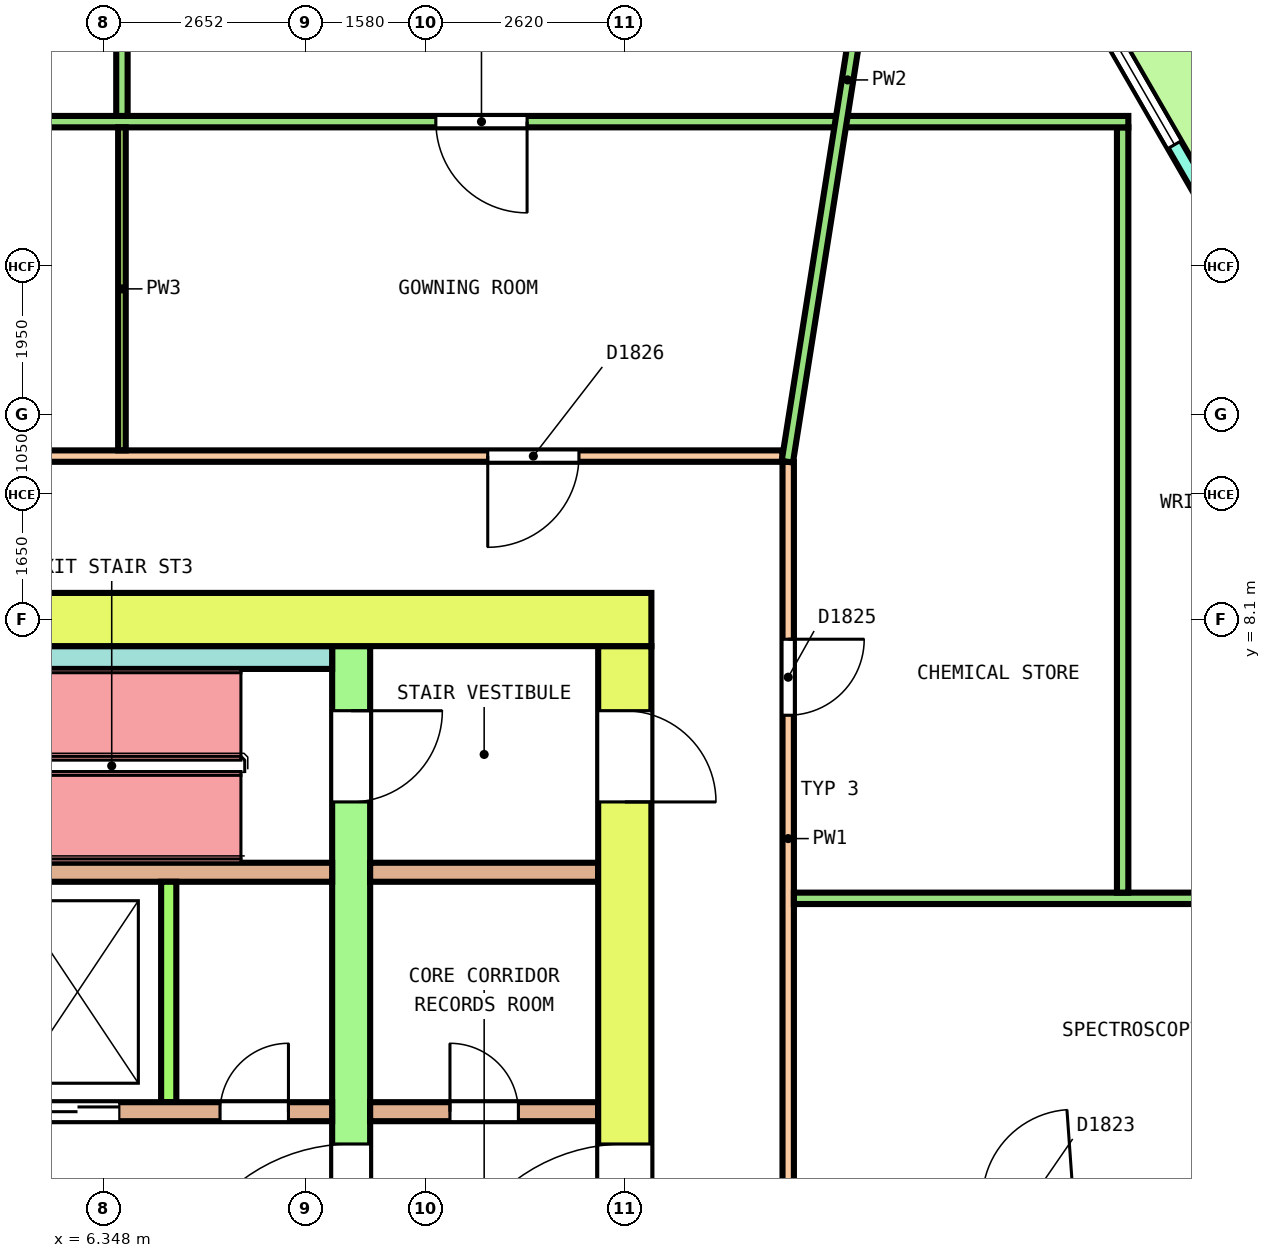
"""IFC4 building model, lengths in metres.
Left out: names, types, materials, properties, quantities, classifications, styles, units other than length and angle.
Written with IfcOpenShell. Run it as: python <this file> out.ifc"""

import sys

from ifc_helpers import new_model, si_unit, direction, frame, frame_2d, origin, place, context, subcontext, project, spatial, polyline, rectangle, outline, extrude, element, fill, save


model = new_model("IFC4")
c1 = context("Model", 3, precision=1e-05, world=origin(), true_north=direction((0.0, 1.0)))
c2 = subcontext(c1, "Body", "Model", "MODEL_VIEW")
j1 = project(units=[si_unit("LENGTHUNIT", "METRE"), si_unit("PLANEANGLEUNIT", "RADIAN")], contexts=[c1])
p1 = place(None, origin())
s1 = spatial("IfcSite", under=j1, at=p1, CompositionType="ELEMENT")
p2 = place(p1, origin())
s2 = spatial("IfcBuilding", under=s1, at=p2, CompositionType="ELEMENT")
p3 = place(p2, frame((0.0, 0.0, 176.0)))
s3 = spatial("IfcBuildingStorey", under=s2, at=p3, CompositionType="ELEMENT", Elevation=176.0)
p4 = place(p3, frame((26.172, 4.405, 0.0), z_axis=(0.0, 0.0, 1.0), x_axis=(-0.500000942564, 0.866024859594, 0.0)))
e1 = element("IfcWall", 1, at=p4, inside=s3, PredefinedType="SOLIDWALL", context=c2, shape_type="SweptSolid", body=[
    extrude(outline(polyline([(-0.027, -0.1), (1.006, -0.1), (2.039, -0.1), (3.072, -0.1), (4.105, -0.1), (5.138, -0.1), (6.172, -0.1), (7.205, -0.1), (8.238, -0.1), (9.271, -0.1), (10.304, -0.1), (11.337, -0.1), (12.37, -0.1), (13.403, -0.1), (14.436, -0.1), (15.469, -0.1), (16.502, -0.1), (17.535, -0.1), (18.568, -0.1), (18.515, 0.1), (17.488, 0.1), (16.46, 0.1), (15.433, 0.1), (14.406, 0.1), (13.379, 0.1), (12.352, 0.1), (11.325, 0.1), (10.298, 0.1), (9.271, 0.1), (8.244, 0.1), (7.217, 0.1), (6.189, 0.1), (5.162, 0.1), (4.135, 0.1), (3.108, 0.1), (2.081, 0.1), (1.054, 0.1), (0.027, 0.1), (-0.027, -0.1)])), origin(), (0.0, 0.0, 1.0), 4.1),
])
p5 = place(p4, frame((0.354, 0.0, 0.1)))
e2 = element("IfcOpeningElement", 2, at=p5, cuts=e1, PredefinedType="OPENING", context=c2, shape_type="SweptSolid", body=[
    extrude(rectangle(XDim=3.0, YDim=2.9, at=frame_2d((1.5, 1.45))), frame((0.0, 0.11, 0.0), z_axis=(0.0, -1.0, 0.0), x_axis=(1.0, 0.0, 0.0)), (0.0, 0.0, 1.0), 0.22),
])
p6 = place(p4, frame((4.062, 0.0, 0.1)))
e3 = element("IfcOpeningElement", 3, at=p6, cuts=e1, PredefinedType="OPENING", context=c2, shape_type="SweptSolid", body=[
    extrude(rectangle(XDim=3.0, YDim=2.9, at=frame_2d((1.5, 1.45))), frame((0.0, 0.11, 0.0), z_axis=(0.0, -1.0, 0.0), x_axis=(1.0, 0.0, 0.0)), (0.0, 0.0, 1.0), 0.22),
])
p7 = place(p4, frame((8.371, 0.0, 0.0)))
e4 = element("IfcOpeningElement", 4, at=p7, cuts=e1, PredefinedType="OPENING", context=c2, shape_type="SweptSolid", body=[
    extrude(rectangle(XDim=1.8, YDim=2.4, at=frame_2d((0.9, 1.2))), frame((0.0, 0.11, 0.0), z_axis=(0.0, -1.0, 0.0), x_axis=(1.0, 0.0, 0.0)), (0.0, 0.0, 1.0), 0.22),
])
p8 = place(p4, frame((8.371, 0.0, 2.55)))
e5 = element("IfcOpeningElement", 5, at=p8, cuts=e1, PredefinedType="OPENING", context=c2, shape_type="SweptSolid", body=[
    extrude(rectangle(XDim=1.8, YDim=0.45, at=frame_2d((0.9, 0.225))), frame((0.0, 0.11, 0.0), z_axis=(0.0, -1.0, 0.0), x_axis=(1.0, 0.0, 0.0)), (0.0, 0.0, 1.0), 0.22),
])
p9 = place(p4, frame((11.479, 0.0, 0.1)))
e6 = element("IfcOpeningElement", 6, at=p9, cuts=e1, PredefinedType="OPENING", context=c2, shape_type="SweptSolid", body=[
    extrude(rectangle(XDim=3.0, YDim=2.9, at=frame_2d((1.5, 1.45))), frame((0.0, 0.11, 0.0), z_axis=(0.0, -1.0, 0.0), x_axis=(1.0, 0.0, 0.0)), (0.0, 0.0, 1.0), 0.22),
])
p10 = place(p4, frame((15.188, 0.0, 0.1)))
e7 = element("IfcOpeningElement", 7, at=p10, cuts=e1, PredefinedType="OPENING", context=c2, shape_type="SweptSolid", body=[
    extrude(rectangle(XDim=3.0, YDim=2.9, at=frame_2d((1.5, 1.45))), frame((0.0, 0.11, 0.0), z_axis=(0.0, -1.0, 0.0), x_axis=(1.0, 0.0, 0.0)), (0.0, 0.0, 1.0), 0.22),
])
p11 = place(p3, frame((-13.55, 8.1, 0.0), z_axis=(0.0, 0.0, 1.0), x_axis=(1.0, 0.0, 0.0)))
e8 = element("IfcWall", 8, at=p11, inside=s3, PredefinedType="SHEAR", context=c2, shape_type="SweptSolid", body=[
    extrude(rectangle(XDim=27.1, YDim=0.7, at=frame_2d((13.55, 0.0))), origin(), (0.0, 0.0, 1.0), 4.1),
])
p12 = place(p11, frame((14.475, 0.0, 0.0)))
e9 = element("IfcOpeningElement", 9, at=p12, cuts=e8, PredefinedType="OPENING", context=c2, shape_type="SweptSolid", body=[
    extrude(rectangle(XDim=1.4, YDim=2.1, at=frame_2d((0.7, 1.05))), frame((0.0, 0.36, 0.0), z_axis=(0.0, -1.0, 0.0), x_axis=(1.0, 0.0, 0.0)), (0.0, 0.0, 1.0), 0.72),
])
p13 = place(p3, frame((13.2, -7.75, 0.0), z_axis=(0.0, 0.0, 1.0), x_axis=(0.0, 1.0, 0.0)))
e10 = element("IfcWall", 10, at=p13, inside=s3, PredefinedType="SHEAR", context=c2, shape_type="SweptSolid", body=[
    extrude(rectangle(XDim=15.5, YDim=0.7, at=frame_2d((7.75, 0.0))), origin(), (0.0, 0.0, 1.0), 4.1),
])
p14 = place(p13, frame((6.55, 0.0, 0.0)))
e11 = element("IfcOpeningElement", 11, at=p14, cuts=e10, PredefinedType="OPENING", context=c2, shape_type="SweptSolid", body=[
    extrude(rectangle(XDim=2.4, YDim=2.1, at=frame_2d((1.2, 1.05))), frame((0.0, 0.36, 0.0), z_axis=(0.0, -1.0, 0.0), x_axis=(1.0, 0.0, 0.0)), (0.0, 0.0, 1.0), 0.72),
])
p15 = place(p13, frame((13.45, 0.0, 0.0)))
e12 = element("IfcOpeningElement", 12, at=p15, cuts=e10, PredefinedType="OPENING", context=c2, shape_type="SweptSolid", body=[
    extrude(rectangle(XDim=1.2, YDim=2.1, at=frame_2d((0.6, 1.05))), frame((0.0, 0.36, 0.0), z_axis=(0.0, -1.0, 0.0), x_axis=(1.0, 0.0, 0.0)), (0.0, 0.0, 1.0), 0.72),
])
p16 = place(p13, frame((0.95, 0.0, 0.0)))
e13 = element("IfcOpeningElement", 13, at=p16, cuts=e10, PredefinedType="OPENING", context=c2, shape_type="SweptSolid", body=[
    extrude(rectangle(XDim=1.0, YDim=2.1, at=frame_2d((0.5, 1.05))), frame((0.0, 0.36, 0.0), z_axis=(0.0, -1.0, 0.0), x_axis=(1.0, 0.0, 0.0)), (0.0, 0.0, 1.0), 0.72),
])
p17 = place(p3, frame((9.6, -7.75, 0.0), z_axis=(0.0, 0.0, 1.0), x_axis=(0.0, 1.0, 0.0)))
e14 = element("IfcWall", 14, at=p17, inside=s3, PredefinedType="SHEAR", context=c2, shape_type="SweptSolid", body=[
    extrude(rectangle(XDim=15.5, YDim=0.5, at=frame_2d((7.75, 0.0))), origin(), (0.0, 0.0, 1.0), 4.1),
])
p18 = place(p17, frame((6.55, 0.0, 0.0)))
e15 = element("IfcOpeningElement", 15, at=p18, cuts=e14, PredefinedType="OPENING", context=c2, shape_type="SweptSolid", body=[
    extrude(rectangle(XDim=2.4, YDim=2.1, at=frame_2d((1.2, 1.05))), frame((0.0, 0.26, 0.0), z_axis=(0.0, -1.0, 0.0), x_axis=(1.0, 0.0, 0.0)), (0.0, 0.0, 1.0), 0.52),
])
p19 = place(p17, frame((13.45, 0.0, 0.0)))
e16 = element("IfcOpeningElement", 16, at=p19, cuts=e14, PredefinedType="OPENING", context=c2, shape_type="SweptSolid", body=[
    extrude(rectangle(XDim=1.2, YDim=2.1, at=frame_2d((0.6, 1.05))), frame((0.0, 0.26, 0.0), z_axis=(0.0, -1.0, 0.0), x_axis=(1.0, 0.0, 0.0)), (0.0, 0.0, 1.0), 0.52),
])
p20 = place(p17, frame((0.95, 0.0, 0.0)))
e17 = element("IfcOpeningElement", 17, at=p20, cuts=e14, PredefinedType="OPENING", context=c2, shape_type="SweptSolid", body=[
    extrude(rectangle(XDim=1.0, YDim=2.1, at=frame_2d((0.5, 1.05))), frame((0.0, 0.26, 0.0), z_axis=(0.0, -1.0, 0.0), x_axis=(1.0, 0.0, 0.0)), (0.0, 0.0, 1.0), 0.52),
])
p21 = place(p3, frame((-9.35, 1.625, 0.0), z_axis=(0.0, 0.0, 1.0), x_axis=(1.0, 0.0, 0.0)))
e18 = element("IfcWall", 18, at=p21, inside=s3, PredefinedType="SOLIDWALL", context=c2, shape_type="SweptSolid", body=[
    extrude(rectangle(XDim=18.7, YDim=0.25, at=frame_2d((9.35, 0.0))), origin(), (0.0, 0.0, 1.0), 4.1),
])
p22 = place(p21, frame((2.85, 0.0, 0.0)))
e19 = element("IfcOpeningElement", 19, at=p22, cuts=e18, PredefinedType="OPENING", context=c2, shape_type="SweptSolid", body=[
    extrude(rectangle(XDim=1.1, YDim=2.1, at=frame_2d((0.55, 1.05))), frame((0.0, 0.135, 0.0), z_axis=(0.0, -1.0, 0.0), x_axis=(1.0, 0.0, 0.0)), (0.0, 0.0, 1.0), 0.27),
])
p23 = place(p21, frame((5.15, 0.0, 0.0)))
e20 = element("IfcOpeningElement", 20, at=p23, cuts=e18, PredefinedType="OPENING", context=c2, shape_type="SweptSolid", body=[
    extrude(rectangle(XDim=1.1, YDim=2.1, at=frame_2d((0.55, 1.05))), frame((0.0, 0.135, 0.0), z_axis=(0.0, -1.0, 0.0), x_axis=(1.0, 0.0, 0.0)), (0.0, 0.0, 1.0), 0.27),
])
p24 = place(p21, frame((14.8, 0.0, 0.0)))
e21 = element("IfcOpeningElement", 21, at=p24, cuts=e18, PredefinedType="OPENING", context=c2, shape_type="SweptSolid", body=[
    extrude(rectangle(XDim=1.1, YDim=2.1, at=frame_2d((0.55, 1.05))), frame((0.0, 0.135, 0.0), z_axis=(0.0, -1.0, 0.0), x_axis=(1.0, 0.0, 0.0)), (0.0, 0.0, 1.0), 0.27),
])
p25 = place(p21, frame((0.575, 0.0, 0.0)))
e22 = element("IfcOpeningElement", 22, at=p25, cuts=e18, PredefinedType="OPENING", context=c2, shape_type="SweptSolid", body=[
    extrude(rectangle(XDim=0.9, YDim=2.1, at=frame_2d((0.45, 1.05))), frame((0.0, 0.135, 0.0), z_axis=(0.0, -1.0, 0.0), x_axis=(1.0, 0.0, 0.0)), (0.0, 0.0, 1.0), 0.27),
])
p26 = place(p21, frame((17.225, 0.0, 0.0)))
e23 = element("IfcOpeningElement", 23, at=p26, cuts=e18, PredefinedType="OPENING", context=c2, shape_type="SweptSolid", body=[
    extrude(rectangle(XDim=0.9, YDim=2.1, at=frame_2d((0.45, 1.05))), frame((0.0, 0.135, 0.0), z_axis=(0.0, -1.0, 0.0), x_axis=(1.0, 0.0, 0.0)), (0.0, 0.0, 1.0), 0.27),
])
p27 = place(p3, frame((9.85, 1.625, 0.0), z_axis=(0.0, 0.0, 1.0), x_axis=(1.0, 0.0, 0.0)))
e24 = element("IfcWall", 24, at=p27, inside=s3, PredefinedType="SOLIDWALL", context=c2, shape_type="SweptSolid", body=[
    extrude(rectangle(XDim=3.0, YDim=0.25, at=frame_2d((1.5, 0.0))), origin(), (0.0, 0.0, 1.0), 4.1),
])
p28 = place(p27, frame((1.05, 0.0, 0.0)))
e25 = element("IfcOpeningElement", 25, at=p28, cuts=e24, PredefinedType="OPENING", context=c2, shape_type="SweptSolid", body=[
    extrude(rectangle(XDim=0.9, YDim=2.1, at=frame_2d((0.45, 1.05))), frame((0.0, 0.135, 0.0), z_axis=(0.0, -1.0, 0.0), x_axis=(1.0, 0.0, 0.0)), (0.0, 0.0, 1.0), 0.27),
])
p29 = place(p3, frame((-9.35, 4.775, 0.0), z_axis=(0.0, 0.0, 1.0), x_axis=(1.0, 0.0, 0.0)))
e26 = element("IfcWall", 26, at=p29, inside=s3, PredefinedType="SOLIDWALL", context=c2, shape_type="SweptSolid", body=[
    extrude(rectangle(XDim=18.7, YDim=0.25, at=frame_2d((9.35, 0.0))), origin(), (0.0, 0.0, 1.0), 4.1),
])
p30 = place(p3, frame((9.85, 4.775, 0.0), z_axis=(0.0, 0.0, 1.0), x_axis=(1.0, 0.0, 0.0)))
e27 = element("IfcWall", 27, at=p30, inside=s3, PredefinedType="SOLIDWALL", context=c2, shape_type="SweptSolid", body=[
    extrude(rectangle(XDim=3.0, YDim=0.25, at=frame_2d((1.5, 0.0))), origin(), (0.0, 0.0, 1.0), 4.1),
])
p31 = place(p3, frame((7.2, 1.75, 0.0), z_axis=(0.0, 0.0, 1.0), x_axis=(0.0, 1.0, 0.0)))
e28 = element("IfcWall", 28, at=p31, inside=s3, PredefinedType="SOLIDWALL", context=c2, shape_type="SweptSolid", body=[
    extrude(rectangle(XDim=2.9, YDim=0.2, at=frame_2d((1.45, 0.0))), origin(), (0.0, 0.0, 1.0), 4.1),
])
p32 = place(p3, frame((3.55, 7.6, 0.0), z_axis=(0.0, 0.0, 1.0), x_axis=(1.0, 0.0, 0.0)))
e29 = element("IfcWall", 29, at=p32, inside=s3, PredefinedType="SOLIDWALL", context=c2, shape_type="SweptSolid", body=[
    extrude(rectangle(XDim=5.8, YDim=0.3, at=frame_2d((2.9, 0.0))), origin(), (0.0, 0.0, 1.0), 4.1),
])
p33 = place(p3, frame((15.35, 0.261, 0.0), z_axis=(0.0, 0.0, 1.0), x_axis=(0.0, 1.0, 0.0)))
e30 = element("IfcWall", 30, at=p33, inside=s3, PredefinedType="PARTITIONING", context=c2, shape_type="SweptSolid", body=[
    extrude(rectangle(XDim=9.914, YDim=0.15, at=frame_2d((4.957, 0.0))), origin(), (0.0, 0.0, 1.0), 3.05),
])
p34 = place(p33, frame((6.58, 0.0, 0.0)))
e31 = element("IfcOpeningElement", 31, at=p34, cuts=e30, PredefinedType="OPENING", context=c2, shape_type="SweptSolid", body=[
    extrude(rectangle(XDim=1.0, YDim=2.1, at=frame_2d((0.5, 1.05))), frame((0.0, 0.085, 0.0), z_axis=(0.0, -1.0, 0.0), x_axis=(1.0, 0.0, 0.0)), (0.0, 0.0, 1.0), 0.17),
])
p35 = place(p3, frame((-15.275, 10.25, 0.0), z_axis=(0.0, 0.0, 1.0), x_axis=(1.0, 0.0, 0.0)))
e32 = element("IfcWall", 32, at=p35, inside=s3, PredefinedType="PARTITIONING", context=c2, shape_type="SweptSolid", body=[
    extrude(rectangle(XDim=30.55, YDim=0.15, at=frame_2d((15.275, 0.0))), origin(), (0.0, 0.0, 1.0), 3.05),
])
p36 = place(p35, frame((26.672, 0.0, 0.0)))
e33 = element("IfcOpeningElement", 33, at=p36, cuts=e32, PredefinedType="OPENING", context=c2, shape_type="SweptSolid", body=[
    extrude(rectangle(XDim=1.2, YDim=2.1, at=frame_2d((0.6, 1.05))), frame((0.0, 0.085, 0.0), z_axis=(0.0, -1.0, 0.0), x_axis=(1.0, 0.0, 0.0)), (0.0, 0.0, 1.0), 0.17),
])
p37 = place(p35, frame((13.779, 0.0, 0.0)))
e34 = element("IfcOpeningElement", 34, at=p37, cuts=e32, PredefinedType="OPENING", context=c2, shape_type="SweptSolid", body=[
    extrude(rectangle(XDim=1.2, YDim=2.1, at=frame_2d((0.6, 1.05))), frame((0.0, 0.085, 0.0), z_axis=(0.0, -1.0, 0.0), x_axis=(1.0, 0.0, 0.0)), (0.0, 0.0, 1.0), 0.17),
])
p38 = place(p3, frame((15.275, 0.18, 0.0), z_axis=(0.0, 0.0, 1.0), x_axis=(0.997445401141, 0.071432987776, 0.0)))
e35 = element("IfcWall", 35, at=p38, inside=s3, PredefinedType="PARTITIONING", context=c2, shape_type="SweptSolid", body=[
    extrude(rectangle(XDim=10.824, YDim=0.15, at=frame_2d((5.412, 0.0))), origin(), (0.0, 0.0, 1.0), 3.05),
])
p39 = place(p38, frame((2.637, 0.0, 0.0)))
e36 = element("IfcOpeningElement", 36, at=p39, cuts=e35, PredefinedType="OPENING", context=c2, shape_type="SweptSolid", body=[
    extrude(rectangle(XDim=1.2, YDim=2.1, at=frame_2d((0.6, 1.05))), frame((0.0, 0.085, 0.0), z_axis=(0.0, -1.0, 0.0), x_axis=(1.0, 0.0, 0.0)), (0.0, 0.0, 1.0), 0.17),
])
p40 = place(p3, frame((15.425, 4.432, 0.0), z_axis=(0.0, 0.0, 1.0), x_axis=(1.0, 0.0, 0.0)))
e37 = element("IfcWall", 37, at=p40, inside=s3, PredefinedType="PARTITIONING", context=c2, shape_type="SweptSolid", body=[
    extrude(rectangle(XDim=10.616, YDim=0.15, at=frame_2d((5.308, 0.0))), origin(), (0.0, 0.0, 1.0), 3.05),
])
p41 = place(p40, frame((5.823, 0.0, 0.0)))
e38 = element("IfcOpeningElement", 38, at=p41, cuts=e37, PredefinedType="OPENING", context=c2, shape_type="SweptSolid", body=[
    extrude(rectangle(XDim=1.0, YDim=2.1, at=frame_2d((0.5, 1.05))), frame((0.0, 0.085, 0.0), z_axis=(0.0, -1.0, 0.0), x_axis=(1.0, 0.0, 0.0)), (0.0, 0.0, 1.0), 0.17),
])
p42 = place(p3, frame((19.75, 4.507, 0.0), z_axis=(0.0, 0.0, 1.0), x_axis=(0.0, 1.0, 0.0)))
e39 = element("IfcWall", 39, at=p42, inside=s3, PredefinedType="PARTITIONING", context=c2, shape_type="SweptSolid", body=[
    extrude(rectangle(XDim=10.068, YDim=0.15, at=frame_2d((5.034, 0.0))), origin(), (0.0, 0.0, 1.0), 3.05),
])
p43 = place(p3, frame((-19.675, 14.65, 0.0), z_axis=(0.0, 0.0, 1.0), x_axis=(1.0, 0.0, 0.0)))
e40 = element("IfcWall", 40, at=p43, inside=s3, PredefinedType="PARTITIONING", context=c2, shape_type="SweptSolid", body=[
    extrude(rectangle(XDim=39.5, YDim=0.15, at=frame_2d((19.75, 0.0))), origin(), (0.0, 0.0, 1.0), 3.05),
])
p44 = place(p43, frame((30.39, 0.0, 0.0)))
e41 = element("IfcOpeningElement", 41, at=p44, cuts=e40, PredefinedType="OPENING", context=c2, shape_type="SweptSolid", body=[
    extrude(rectangle(XDim=1.2, YDim=2.1, at=frame_2d((0.6, 1.05))), frame((0.0, 0.085, 0.0), z_axis=(0.0, -1.0, 0.0), x_axis=(1.0, 0.0, 0.0)), (0.0, 0.0, 1.0), 0.17),
])
p45 = place(p3, frame((15.338, 10.176, 0.0), z_axis=(0.0, 0.0, 1.0), x_axis=(0.155961340777, 0.987763159965, 0.0)))
e42 = element("IfcWall", 42, at=p45, inside=s3, PredefinedType="PARTITIONING", context=c2, shape_type="SweptSolid", body=[
    extrude(rectangle(XDim=10.17, YDim=0.15, at=frame_2d((5.085, 0.0))), origin(), (0.0, 0.0, 1.0), 3.05),
])
p46 = place(p3, frame((6.584, 14.725, 0.0), z_axis=(0.0, 0.0, 1.0), x_axis=(0.0, 1.0, 0.0)))
e43 = element("IfcWall", 43, at=p46, inside=s3, PredefinedType="PARTITIONING", context=c2, shape_type="SweptSolid", body=[
    extrude(rectangle(XDim=9.075, YDim=0.15, at=frame_2d((4.538, 0.0))), origin(), (0.0, 0.0, 1.0), 3.05),
])
p47 = place(p46, frame((3.9, 0.0, 0.0)))
e44 = element("IfcOpeningElement", 44, at=p47, cuts=e43, PredefinedType="OPENING", context=c2, shape_type="SweptSolid", body=[
    extrude(rectangle(XDim=1.2, YDim=2.1, at=frame_2d((0.6, 1.05))), frame((0.0, 0.085, 0.0), z_axis=(0.0, -1.0, 0.0), x_axis=(1.0, 0.0, 0.0)), (0.0, 0.0, 1.0), 0.17),
])
p48 = place(p3, frame((6.584, 10.325, 0.0), z_axis=(0.0, 0.0, 1.0), x_axis=(0.0, 1.0, 0.0)))
e45 = element("IfcWall", 45, at=p48, inside=s3, PredefinedType="PARTITIONING", context=c2, shape_type="SweptSolid", body=[
    extrude(rectangle(XDim=4.25, YDim=0.1, at=frame_2d((2.125, 0.0))), origin(), (0.0, 0.0, 1.0), 3.05),
])
p49 = place(p9, origin())
e46 = element("IfcWindow", 46, at=p49, inside=s3, PartitioningType="SINGLE_PANEL", PredefinedType="WINDOW", context=c2, shape_type="SweptSolid", body=[
    extrude(rectangle(XDim=3.0, YDim=2.9, at=frame_2d((1.5, 1.45))), frame((0.0, 0.03, 0.0), z_axis=(0.0, -1.0, 0.0), x_axis=(1.0, 0.0, 0.0)), (0.0, 0.0, 1.0), 0.06),
])
fill(e6, e46)
p50 = place(p24, origin())
e47 = element("IfcDoor", 47, at=p50, inside=s3, OperationType="DOUBLE_DOOR_SLIDING", PredefinedType="DOOR", context=c2, shape_type="SweptSolid", body=[
    extrude(rectangle(XDim=1.1, YDim=2.1, at=frame_2d((0.55, 1.05))), frame((0.0, 0.075, 0.0), z_axis=(0.0, -1.0, 0.0), x_axis=(1.0, 0.0, 0.0)), (0.0, 0.0, 1.0), 0.15),
])
fill(e21, e47)
p51 = place(p18, origin())
e48 = element("IfcDoor", 48, at=p51, inside=s3, OperationType="DOUBLE_DOOR_SINGLE_SWING", PredefinedType="DOOR", context=c2, shape_type="SweptSolid", body=[
    extrude(rectangle(XDim=2.4, YDim=2.1, at=frame_2d((1.2, 1.05))), frame((0.0, 0.2, 0.0), z_axis=(0.0, -1.0, 0.0), x_axis=(1.0, 0.0, 0.0)), (0.0, 0.0, 1.0), 0.4),
])
fill(e15, e48)
p52 = place(p14, origin())
e49 = element("IfcDoor", 49, at=p52, inside=s3, OperationType="DOUBLE_DOOR_SINGLE_SWING", PredefinedType="DOOR", context=c2, shape_type="SweptSolid", body=[
    extrude(rectangle(XDim=2.4, YDim=2.1, at=frame_2d((1.2, 1.05))), frame((0.0, 0.3, 0.0), z_axis=(0.0, -1.0, 0.0), x_axis=(1.0, 0.0, 0.0)), (0.0, 0.0, 1.0), 0.6),
])
fill(e11, e49)
p53 = place(p19, origin())
e50 = element("IfcDoor", 50, at=p53, inside=s3, OperationType="SINGLE_SWING_LEFT", PredefinedType="DOOR", context=c2, shape_type="SweptSolid", body=[
    extrude(rectangle(XDim=1.2, YDim=2.1, at=frame_2d((0.6, 1.05))), frame((0.0, 0.2, 0.0), z_axis=(0.0, -1.0, 0.0), x_axis=(1.0, 0.0, 0.0)), (0.0, 0.0, 1.0), 0.4),
])
fill(e16, e50)
p54 = place(p15, origin())
e51 = element("IfcDoor", 51, at=p54, inside=s3, OperationType="SINGLE_SWING_RIGHT", PredefinedType="DOOR", context=c2, shape_type="SweptSolid", body=[
    extrude(rectangle(XDim=1.2, YDim=2.1, at=frame_2d((0.6, 1.05))), frame((0.0, 0.3, 0.0), z_axis=(0.0, -1.0, 0.0), x_axis=(1.0, 0.0, 0.0)), (0.0, 0.0, 1.0), 0.6),
])
fill(e12, e51)
p55 = place(p26, origin())
e52 = element("IfcDoor", 52, at=p55, inside=s3, OperationType="SINGLE_SWING_LEFT", PredefinedType="DOOR", context=c2, shape_type="SweptSolid", body=[
    extrude(rectangle(XDim=0.9, YDim=2.1, at=frame_2d((0.45, 1.05))), frame((0.0, 0.075, 0.0), z_axis=(0.0, -1.0, 0.0), x_axis=(1.0, 0.0, 0.0)), (0.0, 0.0, 1.0), 0.15),
])
fill(e23, e52)
p56 = place(p28, origin())
e53 = element("IfcDoor", 53, at=p56, inside=s3, OperationType="SINGLE_SWING_RIGHT", PredefinedType="DOOR", context=c2, shape_type="SweptSolid", body=[
    extrude(rectangle(XDim=0.9, YDim=2.1, at=frame_2d((0.45, 1.05))), frame((0.0, 0.075, 0.0), z_axis=(0.0, -1.0, 0.0), x_axis=(1.0, 0.0, 0.0)), (0.0, 0.0, 1.0), 0.15),
])
fill(e25, e53)
p57 = place(p34, origin())
e54 = element("IfcDoor", 54, at=p57, inside=s3, OperationType="SINGLE_SWING_RIGHT", PredefinedType="DOOR", context=c2, shape_type="SweptSolid", body=[
    extrude(rectangle(XDim=1.0, YDim=2.1, at=frame_2d((0.5, 1.05))), frame((0.0, 0.025, 0.0), z_axis=(0.0, -1.0, 0.0), x_axis=(1.0, 0.0, 0.0)), (0.0, 0.0, 1.0), 0.05),
])
fill(e31, e54)
p58 = place(p36, origin())
e55 = element("IfcDoor", 55, at=p58, inside=s3, OperationType="DOUBLE_DOOR_SINGLE_SWING", PredefinedType="DOOR", context=c2, shape_type="SweptSolid", body=[
    extrude(rectangle(XDim=1.2, YDim=2.1, at=frame_2d((0.6, 1.05))), frame((0.0, 0.025, 0.0), z_axis=(0.0, -1.0, 0.0), x_axis=(1.0, 0.0, 0.0)), (0.0, 0.0, 1.0), 0.05),
])
fill(e33, e55)
p59 = place(p44, origin())
e56 = element("IfcDoor", 56, at=p59, inside=s3, OperationType="DOUBLE_DOOR_SINGLE_SWING", PredefinedType="DOOR", context=c2, shape_type="SweptSolid", body=[
    extrude(rectangle(XDim=1.2, YDim=2.1, at=frame_2d((0.6, 1.05))), frame((0.0, 0.025, 0.0), z_axis=(0.0, -1.0, 0.0), x_axis=(1.0, 0.0, 0.0)), (0.0, 0.0, 1.0), 0.05),
])
fill(e41, e56)
save(model, sys.argv[1])
